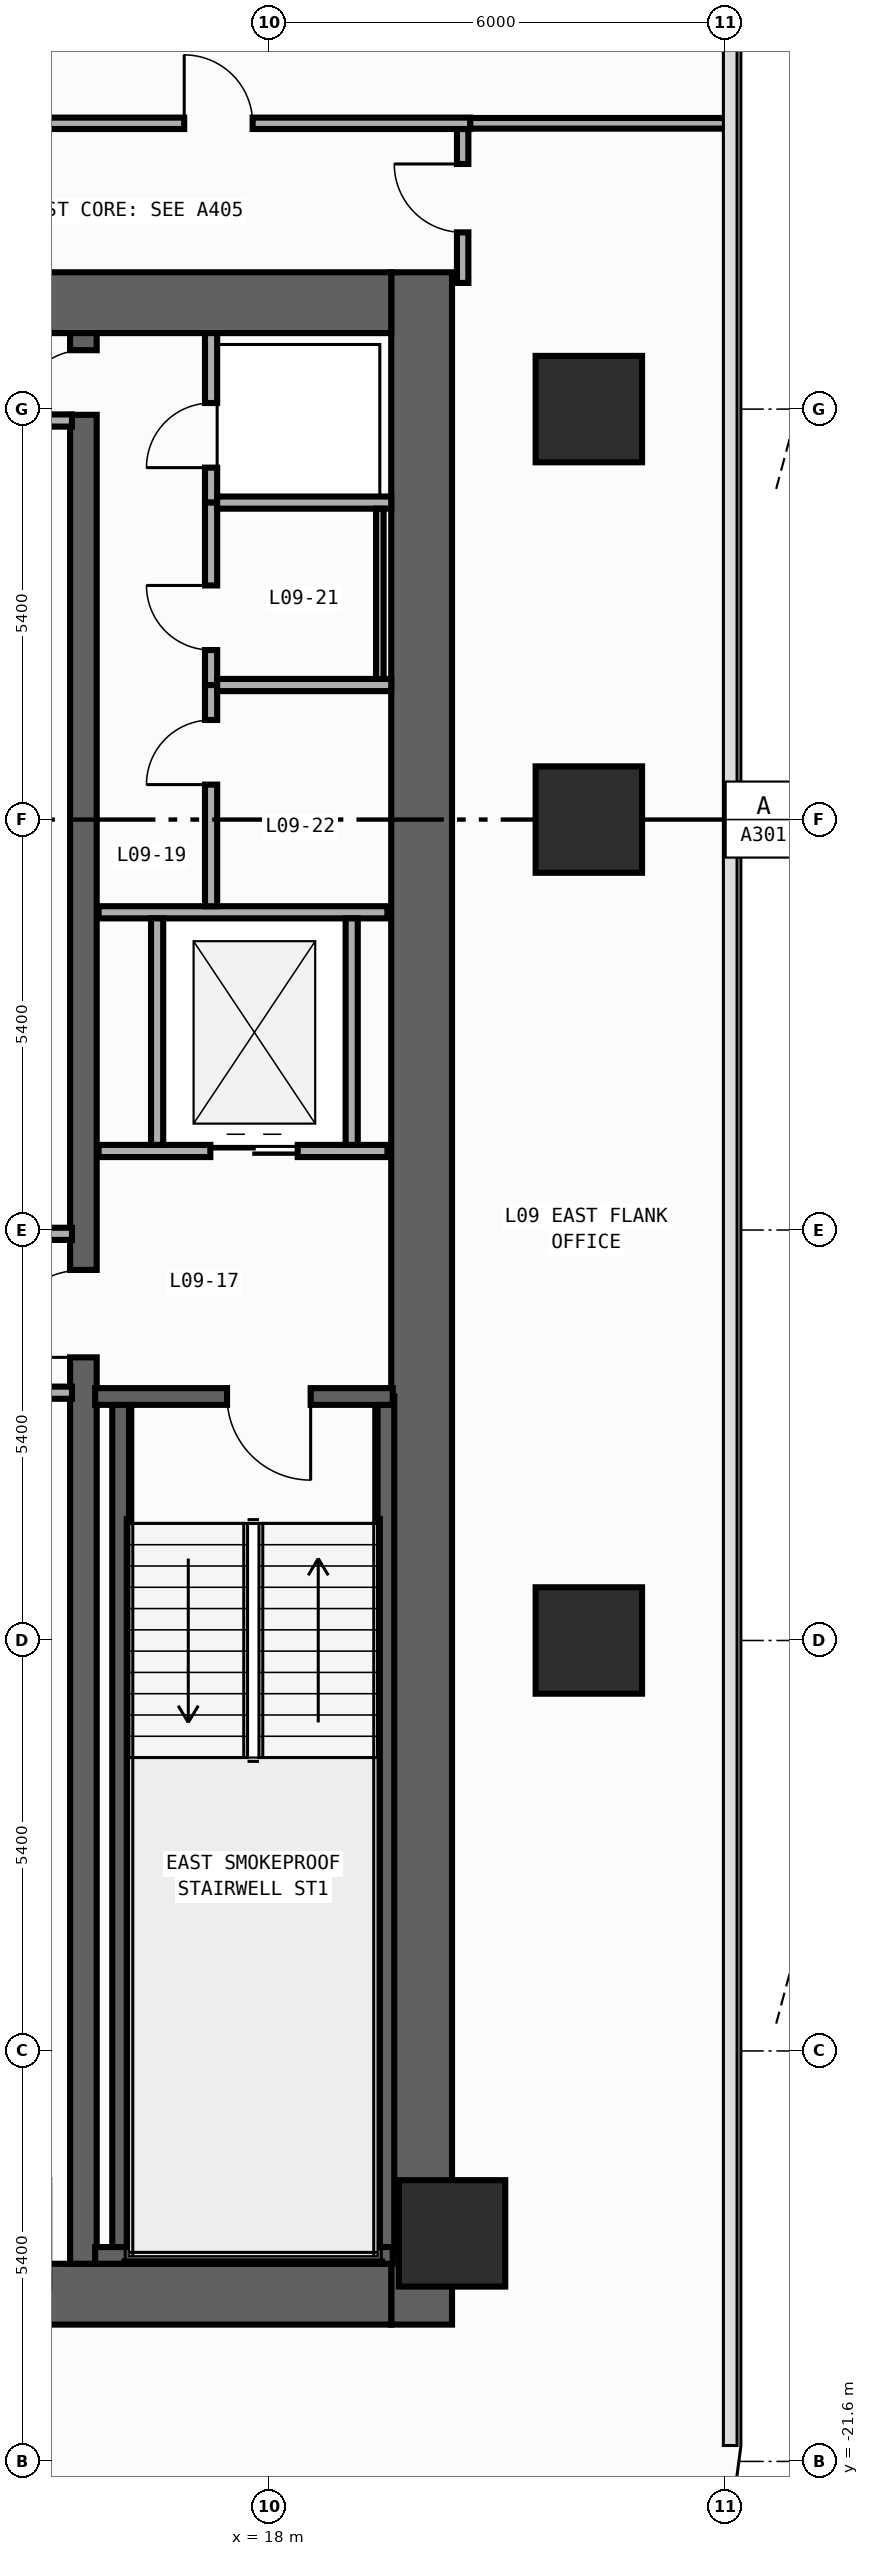
"""IFC4 building model, lengths in metres.
Left out: names, types, materials, properties, quantities, classifications, styles, units other than length and angle.
Written with IfcOpenShell. Run it as: python <this file> out.ifc"""

import sys

from ifc_helpers import new_model, si_unit, direction, frame, frame_2d, origin, origin_2d, place, context, subcontext, project, spatial, rectangle, extrude, element, fill, save


model = new_model("IFC4")
c1 = context("Model", 3, precision=1e-05, world=origin(), true_north=direction((0.0, 1.0)))
c2 = subcontext(c1, "Body", "Model", "MODEL_VIEW")
j1 = project(units=[si_unit("LENGTHUNIT", "METRE"), si_unit("PLANEANGLEUNIT", "RADIAN")], contexts=[c1])
p1 = place(None, origin())
s1 = spatial("IfcSite", under=j1, at=p1, CompositionType="ELEMENT")
p2 = place(p1, origin())
s2 = spatial("IfcBuilding", under=s1, at=p2, CompositionType="ELEMENT")
p3 = place(p2, frame((0.0, 0.0, 38.6)))
s3 = spatial("IfcBuildingStorey", under=s2, at=p3, CompositionType="ELEMENT", Elevation=38.6)
p4 = place(p3, frame((20.0, -19.8, 0.0), z_axis=(0.0, 0.0, 1.0), x_axis=(0.0, 1.0, 0.0)))
e1 = element("IfcWall", 1, at=p4, inside=s3, PredefinedType="SHEAR", context=c2, shape_type="SweptSolid", body=[
    extrude(rectangle(XDim=27.0, YDim=0.8, at=frame_2d((13.5, 0.0))), origin(), (0.0, 0.0, 1.0), 3.94),
])
for number, where, z_axis, x_axis in (
    (2, (12.8, -19.4, 0.0), (0.0, 0.0, 1.0), (1.0, 0.0, 0.0)),
    (3, (12.8, 6.8, 0.0), (0.0, 0.0, 1.0), (1.0, 0.0, 0.0)),
):
    element("IfcWall", number, at=place(p3, frame(where, z_axis=z_axis, x_axis=x_axis)), inside=s3, PredefinedType="SHEAR", context=c2, shape_type="SweptSolid", body=[
        extrude(rectangle(XDim=6.8, YDim=0.8, at=frame_2d((3.4, 0.0))), origin(), (0.0, 0.0, 1.0), 3.94),
    ])
p5 = place(p3, frame((15.55, -19.0, 0.0), z_axis=(0.0, 0.0, 1.0), x_axis=(0.0, 1.0, 0.0)))
e4 = element("IfcWall", 4, at=p5, inside=s3, PredefinedType="SHEAR", context=c2, shape_type="SweptSolid", body=[
    extrude(rectangle(XDim=25.4, YDim=0.35, at=frame_2d((12.7, 0.0))), origin(), (0.0, 0.0, 1.0), 3.94),
])
p6 = place(p5, frame((11.925, 0.0, 0.0)))
e5 = element("IfcOpeningElement", 5, at=p6, cuts=e4, PredefinedType="OPENING", context=c2, shape_type="SweptSolid", body=[
    extrude(rectangle(XDim=1.15, YDim=2.2, at=frame_2d((0.575, 1.1))), frame((0.0, 0.185, 0.0), z_axis=(0.0, -1.0, 0.0), x_axis=(1.0, 0.0, 0.0)), (0.0, 0.0, 1.0), 0.37),
])
p7 = place(p5, frame((24.325, 0.0, 0.0)))
e6 = element("IfcOpeningElement", 6, at=p7, cuts=e4, PredefinedType="OPENING", context=c2, shape_type="SweptSolid", body=[
    extrude(rectangle(XDim=0.85, YDim=2.1, at=frame_2d((0.425, 1.05))), frame((0.0, 0.185, 0.0), z_axis=(0.0, -1.0, 0.0), x_axis=(1.0, 0.0, 0.0)), (0.0, 0.0, 1.0), 0.37),
])
for number, where, z_axis, x_axis in (
    (7, (16.04, -18.89, 0.0), (0.0, 0.0, 1.0), (0.0, 1.0, 0.0)),
    (8, (19.53, -18.89, 0.0), (0.0, 0.0, 1.0), (0.0, 1.0, 0.0)),
):
    element("IfcWall", number, at=place(p3, frame(where, z_axis=z_axis, x_axis=x_axis)), inside=s3, PredefinedType="SHEAR", context=c2, shape_type="SweptSolid", body=[
        extrude(rectangle(XDim=11.3, YDim=0.22, at=frame_2d((5.65, 0.0))), origin(), (0.0, 0.0, 1.0), 3.94),
    ])
p8 = place(p3, frame((15.705, -18.89, 0.0), z_axis=(0.0, 0.0, 1.0), x_axis=(1.0, 0.0, 0.0)))
e9 = element("IfcWall", 9, at=p8, inside=s3, PredefinedType="SHEAR", context=c2, shape_type="SweptSolid", body=[
    extrude(rectangle(XDim=3.915, YDim=0.22, at=frame_2d((1.958, 0.0))), origin(), (0.0, 0.0, 1.0), 3.94),
])
p9 = place(p3, frame((19.62, -7.59, 0.0), z_axis=(0.0, 0.0, 1.0), x_axis=(-1.0, 0.0, 0.0)))
e10 = element("IfcWall", 10, at=p9, inside=s3, PredefinedType="SHEAR", context=c2, shape_type="SweptSolid", body=[
    extrude(rectangle(XDim=3.915, YDim=0.22, at=frame_2d((1.958, 0.0))), origin(), (0.0, 0.0, 1.0), 3.94),
])
p10 = place(p9, frame((1.08, 0.0, 0.0)))
e11 = element("IfcOpeningElement", 11, at=p10, cuts=e10, PredefinedType="OPENING", context=c2, shape_type="SweptSolid", body=[
    extrude(rectangle(XDim=1.1, YDim=2.2, at=frame_2d((0.55, 1.1))), frame((0.0, 0.12, 0.0), z_axis=(0.0, -1.0, 0.0), x_axis=(1.0, 0.0, 0.0)), (0.0, 0.0, 1.0), 0.24),
])
for number, where, z_axis, x_axis in (
    (12, (20.4, -18.6, 0.0), (0.0, 0.0, 1.0), (1.0, 0.0, 0.0)),
    (13, (22.2, -10.8, 0.0), (0.0, 0.0, 1.0), (1.0, 0.0, 0.0)),
    (14, (22.2, 0.0, 0.0), (0.0, 0.0, 1.0), (1.0, 0.0, 0.0)),
    (15, (22.2, 5.4, 0.0), (0.0, 0.0, 1.0), (1.0, 0.0, 0.0)),
):
    element("IfcColumn", number, at=place(p3, frame(where, z_axis=z_axis, x_axis=x_axis)), inside=s3, PredefinedType="COLUMN", context=c2, shape_type="SweptSolid", body=[
        extrude(rectangle(XDim=1.4, YDim=1.4, at=origin_2d()), origin(), (0.0, 0.0, 1.0), 4.2),
    ])
p11 = place(p3, frame((15.75, -4.36, 0.0), z_axis=(0.0, 0.0, 1.0), x_axis=(1.0, 0.0, 0.0)))
e16 = element("IfcWall", 16, at=p11, inside=s3, PredefinedType="STANDARD", context=c2, shape_type="SweptSolid", body=[
    extrude(rectangle(XDim=3.8, YDim=0.16, at=frame_2d((1.9, 0.0))), origin(), (0.0, 0.0, 1.0), 3.94),
])
p12 = place(p11, frame((1.47, 0.0, 0.0)))
e17 = element("IfcOpeningElement", 17, at=p12, cuts=e16, PredefinedType="OPENING", context=c2, shape_type="SweptSolid", body=[
    extrude(rectangle(XDim=1.15, YDim=2.2, at=frame_2d((0.575, 1.1))), frame((0.0, 0.09, 0.0), z_axis=(0.0, -1.0, 0.0), x_axis=(1.0, 0.0, 0.0)), (0.0, 0.0, 1.0), 0.18),
])
p13 = place(p3, frame((15.75, -1.22, 0.0), z_axis=(0.0, 0.0, 1.0), x_axis=(1.0, 0.0, 0.0)))
e18 = element("IfcWall", 18, at=p13, inside=s3, PredefinedType="STANDARD", context=c2, shape_type="SweptSolid", body=[
    extrude(rectangle(XDim=3.8, YDim=0.16, at=frame_2d((1.9, 0.0))), origin(), (0.0, 0.0, 1.0), 3.94),
])
for number, where, z_axis, x_axis in (
    (19, (16.52, -4.28, 0.0), (0.0, 0.0, 1.0), (0.0, 1.0, 0.0)),
    (20, (19.08, -4.28, 0.0), (0.0, 0.0, 1.0), (0.0, 1.0, 0.0)),
):
    element("IfcWall", number, at=place(p3, frame(where, z_axis=z_axis, x_axis=x_axis)), inside=s3, PredefinedType="STANDARD", context=c2, shape_type="SweptSolid", body=[
        extrude(rectangle(XDim=2.98, YDim=0.16, at=frame_2d((1.49, 0.0))), origin(), (0.0, 0.0, 1.0), 3.94),
    ])
for number, where, z_axis, x_axis in (
    (21, (12.8, -5.45, 0.0), (0.0, 0.0, 1.0), (1.0, 0.0, 0.0)),
    (22, (12.8, -7.54, 0.0), (0.0, 0.0, 1.0), (1.0, 0.0, 0.0)),
    (23, (12.8, 5.25, 0.0), (0.0, 0.0, 1.0), (1.0, 0.0, 0.0)),
):
    element("IfcWall", number, at=place(p3, frame(where, z_axis=z_axis, x_axis=x_axis)), inside=s3, PredefinedType="STANDARD", context=c2, shape_type="SweptSolid", body=[
        extrude(rectangle(XDim=2.6, YDim=0.16, at=frame_2d((1.3, 0.0))), origin(), (0.0, 0.0, 1.0), 3.94),
    ])
p14 = place(p3, frame((17.23, 4.17, 0.0), z_axis=(0.0, 0.0, 1.0), x_axis=(0.0, 1.0, 0.0)))
e24 = element("IfcWall", 24, at=p14, inside=s3, PredefinedType="PARTITIONING", context=c2, shape_type="SweptSolid", body=[
    extrude(rectangle(XDim=2.23, YDim=0.16, at=frame_2d((1.115, 0.0))), origin(), (0.0, 0.0, 1.0), 3.94),
])
p15 = place(p14, frame((0.46, 0.0, 0.0)))
e25 = element("IfcOpeningElement", 25, at=p15, cuts=e24, PredefinedType="OPENING", context=c2, shape_type="SweptSolid", body=[
    extrude(rectangle(XDim=0.85, YDim=2.1, at=frame_2d((0.425, 1.05))), frame((0.0, 0.09, 0.0), z_axis=(0.0, -1.0, 0.0), x_axis=(1.0, 0.0, 0.0)), (0.0, 0.0, 1.0), 0.18),
])
p16 = place(p3, frame((17.23, 1.77, 0.0), z_axis=(0.0, 0.0, 1.0), x_axis=(0.0, 1.0, 0.0)))
e26 = element("IfcWall", 26, at=p16, inside=s3, PredefinedType="PARTITIONING", context=c2, shape_type="SweptSolid", body=[
    extrude(rectangle(XDim=2.4, YDim=0.16, at=frame_2d((1.2, 0.0))), origin(), (0.0, 0.0, 1.0), 3.94),
])
p17 = place(p16, frame((0.46, 0.0, 0.0)))
e27 = element("IfcOpeningElement", 27, at=p17, cuts=e26, PredefinedType="OPENING", context=c2, shape_type="SweptSolid", body=[
    extrude(rectangle(XDim=0.85, YDim=2.1, at=frame_2d((0.425, 1.05))), frame((0.0, 0.09, 0.0), z_axis=(0.0, -1.0, 0.0), x_axis=(1.0, 0.0, 0.0)), (0.0, 0.0, 1.0), 0.18),
])
p18 = place(p3, frame((17.23, -1.14, 0.0), z_axis=(0.0, 0.0, 1.0), x_axis=(0.0, 1.0, 0.0)))
e28 = element("IfcWall", 28, at=p18, inside=s3, PredefinedType="PARTITIONING", context=c2, shape_type="SweptSolid", body=[
    extrude(rectangle(XDim=2.91, YDim=0.16, at=frame_2d((1.455, 0.0))), origin(), (0.0, 0.0, 1.0), 3.94),
])
p19 = place(p18, frame((1.6, 0.0, 0.0)))
e29 = element("IfcOpeningElement", 29, at=p19, cuts=e28, PredefinedType="OPENING", context=c2, shape_type="SweptSolid", body=[
    extrude(rectangle(XDim=0.85, YDim=2.1, at=frame_2d((0.425, 1.05))), frame((0.0, 0.09, 0.0), z_axis=(0.0, -1.0, 0.0), x_axis=(1.0, 0.0, 0.0)), (0.0, 0.0, 1.0), 0.18),
])
for number, where, z_axis, x_axis in (
    (30, (17.31, 4.17, 0.0), (0.0, 0.0, 1.0), (1.0, 0.0, 0.0)),
    (31, (17.31, 1.77, 0.0), (0.0, 0.0, 1.0), (1.0, 0.0, 0.0)),
):
    element("IfcWall", number, at=place(p3, frame(where, z_axis=z_axis, x_axis=x_axis)), inside=s3, PredefinedType="PARTITIONING", context=c2, shape_type="SweptSolid", body=[
        extrude(rectangle(XDim=2.29, YDim=0.16, at=frame_2d((1.145, 0.0))), origin(), (0.0, 0.0, 1.0), 3.94),
    ])
p20 = place(p3, frame((20.54, 7.06, 0.0), z_axis=(0.0, 0.0, 1.0), x_axis=(0.0, 1.0, 0.0)))
e32 = element("IfcWall", 32, at=p20, inside=s3, PredefinedType="PARTITIONING", context=c2, shape_type="SweptSolid", body=[
    extrude(rectangle(XDim=2.025, YDim=0.15, at=frame_2d((1.012, 0.0))), origin(), (0.0, 0.0, 1.0), 3.94),
])
p21 = place(p20, frame((0.665, 0.0, 0.0)))
e33 = element("IfcOpeningElement", 33, at=p21, cuts=e32, PredefinedType="OPENING", context=c2, shape_type="SweptSolid", body=[
    extrude(rectangle(XDim=0.9, YDim=2.15, at=frame_2d((0.45, 1.075))), frame((0.0, 0.085, 0.0), z_axis=(0.0, -1.0, 0.0), x_axis=(1.0, 0.0, 0.0)), (0.0, 0.0, 1.0), 0.17),
])
p22 = place(p3, frame((11.81, 9.16, 0.0), z_axis=(0.0, 0.0, 1.0), x_axis=(1.0, 0.0, 0.0)))
e34 = element("IfcWall", 34, at=p22, inside=s3, PredefinedType="PARTITIONING", context=c2, shape_type="SweptSolid", body=[
    extrude(rectangle(XDim=8.83, YDim=0.15, at=frame_2d((4.415, 0.0))), origin(), (0.0, 0.0, 1.0), 3.94),
])
p23 = place(p22, frame((5.067, 0.0, 0.0)))
e35 = element("IfcOpeningElement", 35, at=p23, cuts=e34, PredefinedType="OPENING", context=c2, shape_type="SweptSolid", body=[
    extrude(rectangle(XDim=0.9, YDim=2.15, at=frame_2d((0.45, 1.075))), frame((0.0, 0.085, 0.0), z_axis=(0.0, -1.0, 0.0), x_axis=(1.0, 0.0, 0.0)), (0.0, 0.0, 1.0), 0.17),
])
p24 = place(p3, frame((20.64, 9.16, 0.0), z_axis=(0.0, 0.0, 1.0), x_axis=(1.0, 0.0, 0.0)))
e36 = element("IfcWall", 36, at=p24, inside=s3, PredefinedType="PARTITIONING", context=c2, shape_type="SweptSolid", body=[
    extrude(rectangle(XDim=3.415, YDim=0.14, at=frame_2d((1.708, 0.0))), origin(), (0.0, 0.0, 1.0), 3.94),
])
p25 = place(p3, frame((19.45, 4.09, 0.0), z_axis=(0.0, 0.0, 1.0), x_axis=(0.0, -1.0, 0.0)))
e37 = element("IfcWall", 37, at=p25, inside=s3, PredefinedType="PARTITIONING", context=c2, shape_type="SweptSolid", body=[
    extrude(rectangle(XDim=2.24, YDim=0.1, at=frame_2d((1.12, 0.0))), origin(), (0.0, 0.0, 1.0), 3.94),
])
p26 = place(p10, origin())
e38 = element("IfcDoor", 38, at=p26, inside=s3, OperationType="SINGLE_SWING_LEFT", PredefinedType="DOOR", context=c2, shape_type="SweptSolid", body=[
    extrude(rectangle(XDim=1.1, YDim=2.2, at=frame_2d((0.55, 1.1))), frame((0.0, 0.025, 0.0), z_axis=(0.0, -1.0, 0.0), x_axis=(1.0, 0.0, 0.0)), (0.0, 0.0, 1.0), 0.05),
])
fill(e11, e38)
p27 = place(p6, origin())
e39 = element("IfcDoor", 39, at=p27, inside=s3, OperationType="SINGLE_SWING_LEFT", PredefinedType="DOOR", context=c2, shape_type="SweptSolid", body=[
    extrude(rectangle(XDim=1.15, YDim=2.2, at=frame_2d((0.575, 1.1))), frame((0.0, 0.025, 0.0), z_axis=(0.0, -1.0, 0.0), x_axis=(1.0, 0.0, 0.0)), (0.0, 0.0, 1.0), 0.05),
])
fill(e5, e39)
p28 = place(p7, origin())
e40 = element("IfcDoor", 40, at=p28, inside=s3, OperationType="SINGLE_SWING_LEFT", PredefinedType="DOOR", context=c2, shape_type="SweptSolid", body=[
    extrude(rectangle(XDim=0.85, YDim=2.1, at=frame_2d((0.425, 1.05))), frame((0.0, 0.025, 0.0), z_axis=(0.0, -1.0, 0.0), x_axis=(1.0, 0.0, 0.0)), (0.0, 0.0, 1.0), 0.05),
])
fill(e6, e40)
p29 = place(p12, origin())
e41 = element("IfcDoor", 41, at=p29, inside=s3, OperationType="DOUBLE_DOOR_SLIDING", PredefinedType="DOOR", context=c2, shape_type="SweptSolid", body=[
    extrude(rectangle(XDim=1.15, YDim=2.2, at=frame_2d((0.575, 1.1))), frame((0.0, 0.025, 0.0), z_axis=(0.0, -1.0, 0.0), x_axis=(1.0, 0.0, 0.0)), (0.0, 0.0, 1.0), 0.05),
])
fill(e17, e41)
p30 = place(p15, origin())
e42 = element("IfcDoor", 42, at=p30, inside=s3, OperationType="SINGLE_SWING_LEFT", PredefinedType="DOOR", context=c2, shape_type="SweptSolid", body=[
    extrude(rectangle(XDim=0.85, YDim=2.1, at=frame_2d((0.425, 1.05))), frame((0.0, 0.025, 0.0), z_axis=(0.0, -1.0, 0.0), x_axis=(1.0, 0.0, 0.0)), (0.0, 0.0, 1.0), 0.05),
])
fill(e25, e42)
p31 = place(p17, origin())
e43 = element("IfcDoor", 43, at=p31, inside=s3, OperationType="SINGLE_SWING_RIGHT", PredefinedType="DOOR", context=c2, shape_type="SweptSolid", body=[
    extrude(rectangle(XDim=0.85, YDim=2.1, at=frame_2d((0.425, 1.05))), frame((0.0, 0.025, 0.0), z_axis=(0.0, -1.0, 0.0), x_axis=(1.0, 0.0, 0.0)), (0.0, 0.0, 1.0), 0.05),
])
fill(e27, e43)
p32 = place(p19, origin())
e44 = element("IfcDoor", 44, at=p32, inside=s3, OperationType="SINGLE_SWING_LEFT", PredefinedType="DOOR", context=c2, shape_type="SweptSolid", body=[
    extrude(rectangle(XDim=0.85, YDim=2.1, at=frame_2d((0.425, 1.05))), frame((0.0, 0.025, 0.0), z_axis=(0.0, -1.0, 0.0), x_axis=(1.0, 0.0, 0.0)), (0.0, 0.0, 1.0), 0.05),
])
fill(e29, e44)
p33 = place(p21, origin())
e45 = element("IfcDoor", 45, at=p33, inside=s3, OperationType="SINGLE_SWING_RIGHT", PredefinedType="DOOR", context=c2, shape_type="SweptSolid", body=[
    extrude(rectangle(XDim=0.9, YDim=2.15, at=frame_2d((0.45, 1.075))), frame((0.0, 0.025, 0.0), z_axis=(0.0, -1.0, 0.0), x_axis=(1.0, 0.0, 0.0)), (0.0, 0.0, 1.0), 0.05),
])
fill(e33, e45)
p34 = place(p23, origin())
e46 = element("IfcDoor", 46, at=p34, inside=s3, OperationType="SINGLE_SWING_LEFT", PredefinedType="DOOR", context=c2, shape_type="SweptSolid", body=[
    extrude(rectangle(XDim=0.9, YDim=2.15, at=frame_2d((0.45, 1.075))), frame((0.0, 0.025, 0.0), z_axis=(0.0, -1.0, 0.0), x_axis=(1.0, 0.0, 0.0)), (0.0, 0.0, 1.0), 0.05),
])
fill(e35, e46)
save(model, sys.argv[1])
